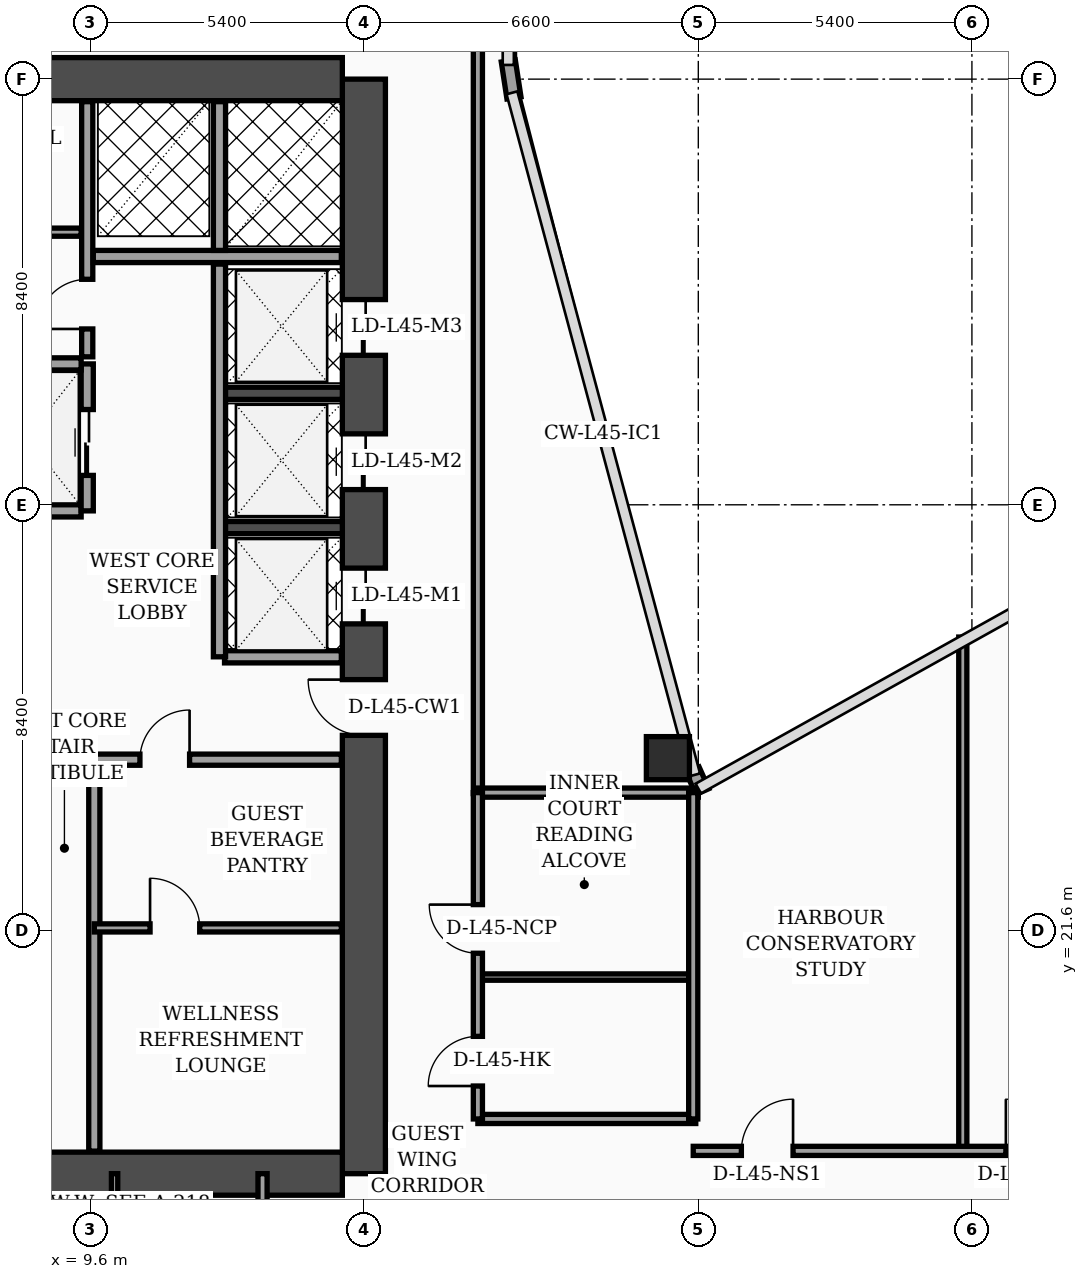
"""IFC4 building model, lengths in metres.
Left out: names, types, materials, properties, quantities, classifications, styles, units other than length and angle.
Written with IfcOpenShell. Run it as: python <this file> out.ifc"""

import sys

from ifc_helpers import new_model, si_unit, direction, frame, frame_2d, origin, origin_2d, place, context, subcontext, project, spatial, rectangle, hollow_rectangle, extrude, element, fill, save


model = new_model("IFC4")
c1 = context("Model", 3, precision=1e-05, world=origin(), true_north=direction((0.0, 1.0)))
c2 = subcontext(c1, "Body", "Model", "MODEL_VIEW")
j1 = project(units=[si_unit("LENGTHUNIT", "METRE"), si_unit("PLANEANGLEUNIT", "RADIAN")], contexts=[c1])
p1 = place(None, origin())
s1 = spatial("IfcSite", under=j1, at=p1, CompositionType="ELEMENT")
p2 = place(p1, origin())
s2 = spatial("IfcBuilding", under=s1, at=p2, CompositionType="ELEMENT")
p3 = place(p2, frame((0.0, 0.0, 182.7)))
s3 = spatial("IfcBuildingStorey", under=s2, at=p3, CompositionType="ELEMENT", Elevation=182.7)
p4 = place(p3, frame((15.0, 16.8, 0.0), z_axis=(0.0, 0.0, 1.0), x_axis=(0.0, 1.0, 0.0)))
e1 = element("IfcWall", 1, at=p4, inside=s3, PredefinedType="SHEAR", context=c2, shape_type="SweptSolid", body=[
    extrude(rectangle(XDim=21.6, YDim=0.85, at=frame_2d((10.8, 0.0))), origin(), (0.0, 0.0, 1.0), 3.52),
])
p5 = place(p4, frame((8.65, 0.0, 0.0)))
e2 = element("IfcOpeningElement", 2, at=p5, cuts=e1, PredefinedType="OPENING", context=c2, shape_type="SweptSolid", body=[
    extrude(rectangle(XDim=1.1, YDim=2.2, at=frame_2d((0.55, 1.1))), frame((0.0, 0.435, 0.0), z_axis=(0.0, -1.0, 0.0), x_axis=(1.0, 0.0, 0.0)), (0.0, 0.0, 1.0), 0.87),
])
p6 = place(p4, frame((10.85, 0.0, 0.0)))
e3 = element("IfcOpeningElement", 3, at=p6, cuts=e1, PredefinedType="OPENING", context=c2, shape_type="SweptSolid", body=[
    extrude(rectangle(XDim=1.1, YDim=2.2, at=frame_2d((0.55, 1.1))), frame((0.0, 0.435, 0.0), z_axis=(0.0, -1.0, 0.0), x_axis=(1.0, 0.0, 0.0)), (0.0, 0.0, 1.0), 0.87),
])
p7 = place(p4, frame((13.5, 0.0, 0.0)))
e4 = element("IfcOpeningElement", 4, at=p7, cuts=e1, PredefinedType="OPENING", context=c2, shape_type="SweptSolid", body=[
    extrude(rectangle(XDim=1.1, YDim=2.2, at=frame_2d((0.55, 1.1))), frame((0.0, 0.435, 0.0), z_axis=(0.0, -1.0, 0.0), x_axis=(1.0, 0.0, 0.0)), (0.0, 0.0, 1.0), 0.87),
])
p8 = place(p4, frame((16.15, 0.0, 0.0)))
e5 = element("IfcOpeningElement", 5, at=p8, cuts=e1, PredefinedType="OPENING", context=c2, shape_type="SweptSolid", body=[
    extrude(rectangle(XDim=1.1, YDim=2.2, at=frame_2d((0.55, 1.1))), frame((0.0, 0.435, 0.0), z_axis=(0.0, -1.0, 0.0), x_axis=(1.0, 0.0, 0.0)), (0.0, 0.0, 1.0), 0.87),
])
for number, where, z_axis, x_axis in (
    (6, (4.625, 38.4, 0.0), (0.0, 0.0, 1.0), (1.0, 0.0, 0.0)),
    (7, (4.625, 16.8, 0.0), (0.0, 0.0, 1.0), (1.0, 0.0, 0.0)),
):
    element("IfcWall", number, at=place(p3, frame(where, z_axis=z_axis, x_axis=x_axis)), inside=s3, PredefinedType="SHEAR", context=c2, shape_type="SweptSolid", body=[
        extrude(rectangle(XDim=9.95, YDim=0.85, at=frame_2d((4.975, 0.0))), origin(), (0.0, 0.0, 1.0), 3.52),
    ])
for number, where, z_axis, x_axis in (
    (8, (12.18, 29.55, 0.0), (0.0, 0.0, 1.0), (1.0, 0.0, 0.0)),
    (9, (12.18, 32.2, 0.0), (0.0, 0.0, 1.0), (1.0, 0.0, 0.0)),
):
    element("IfcWall", number, at=place(p3, frame(where, z_axis=z_axis, x_axis=x_axis)), inside=s3, PredefinedType="SOLIDWALL", context=c2, shape_type="SweptSolid", body=[
        extrude(rectangle(XDim=2.395, YDim=0.24, at=frame_2d((1.198, 0.0))), origin(), (0.0, 0.0, 1.0), 3.52),
    ])
p9 = place(p3, frame((21.0, 25.0, 0.0), z_axis=(0.0, 0.0, 1.0), x_axis=(1.0, 0.0, 0.0)))
e10 = element("IfcColumn", 10, at=p9, inside=s3, PredefinedType="COLUMN", context=c2, shape_type="SweptSolid", body=[
    extrude(hollow_rectangle(XDim=0.85, YDim=0.85, WallThickness=0.036, at=origin_2d()), origin(), (0.0, 0.0, 1.0), 3.52),
])
p10 = place(p3, frame((21.68, 24.34, 0.0), z_axis=(0.0, 0.0, 1.0), x_axis=(-0.40758134973, 0.913168901875, 0.0)))
e11 = element("IfcWall", 11, at=p10, inside=s3, PredefinedType="SOLIDWALL", context=c2, shape_type="SweptSolid", body=[
    extrude(rectangle(XDim=0.471, YDim=0.28, at=frame_2d((0.235, 0.0))), origin(), (0.0, 0.0, 1.0), 3.52),
])
p11 = place(p3, frame((17.962, 38.03, 0.0), z_axis=(0.0, 0.0, 1.0), x_axis=(-0.15141125477, 0.988470855377, 0.0)))
e12 = element("IfcWall", 12, at=p11, inside=s3, PredefinedType="SOLIDWALL", context=c2, shape_type="SweptSolid", body=[
    extrude(rectangle(XDim=0.739, YDim=0.28, at=frame_2d((0.369, 0.0))), origin(), (0.0, 0.0, 1.0), 3.52),
])
p12 = place(p3, frame((4.645, 29.88, 0.0), z_axis=(0.0, 0.0, 1.0), x_axis=(1.0, 0.0, 0.0)))
e13 = element("IfcWall", 13, at=p12, inside=s3, PredefinedType="SOLIDWALL", context=c2, shape_type="SweptSolid", body=[
    extrude(rectangle(XDim=4.775, YDim=0.24, at=frame_2d((2.387, 0.0))), origin(), (0.0, 0.0, 1.0), 3.52),
])
p13 = place(p12, frame((0.45, 0.0, 0.0)))
e14 = element("IfcOpeningElement", 14, at=p13, cuts=e13, PredefinedType="OPENING", context=c2, shape_type="SweptSolid", body=[
    extrude(rectangle(XDim=1.3, YDim=2.35, at=frame_2d((0.65, 1.175))), frame((0.0, 0.13, 0.0), z_axis=(0.0, -1.0, 0.0), x_axis=(1.0, 0.0, 0.0)), (0.0, 0.0, 1.0), 0.26),
])
p14 = place(p3, frame((9.54, 29.88, 0.0), z_axis=(0.0, 0.0, 1.0), x_axis=(0.0, 1.0, 0.0)))
e15 = element("IfcWall", 15, at=p14, inside=s3, PredefinedType="SOLIDWALL", context=c2, shape_type="SweptSolid", body=[
    extrude(rectangle(XDim=2.9, YDim=0.24, at=frame_2d((1.45, 0.0))), origin(), (0.0, 0.0, 1.0), 3.52),
])
p15 = place(p14, frame((0.7, 0.0, 0.0)))
e16 = element("IfcOpeningElement", 16, at=p15, cuts=e15, PredefinedType="OPENING", context=c2, shape_type="SweptSolid", body=[
    extrude(rectangle(XDim=1.3, YDim=2.35, at=frame_2d((0.65, 1.175))), frame((0.0, 0.13, 0.0), z_axis=(0.0, -1.0, 0.0), x_axis=(1.0, 0.0, 0.0)), (0.0, 0.0, 1.0), 0.26),
])
p16 = place(p3, frame((4.645, 32.78, 0.0), z_axis=(0.0, 0.0, 1.0), x_axis=(1.0, 0.0, 0.0)))
e17 = element("IfcWall", 17, at=p16, inside=s3, PredefinedType="SOLIDWALL", context=c2, shape_type="SweptSolid", body=[
    extrude(rectangle(XDim=4.775, YDim=0.24, at=frame_2d((2.387, 0.0))), origin(), (0.0, 0.0, 1.0), 3.17),
])
p17 = place(p3, frame((9.68, 17.245, 0.0), z_axis=(0.0, 0.0, 1.0), x_axis=(0.0, 1.0, 0.0)))
e18 = element("IfcWall", 18, at=p17, inside=s3, PredefinedType="SOLIDWALL", context=c2, shape_type="SweptSolid", body=[
    extrude(rectangle(XDim=7.755, YDim=0.22, at=frame_2d((3.877, 0.0))), origin(), (0.0, 0.0, 1.0), 3.52),
])
p18 = place(p3, frame((4.645, 35.38, 0.0), z_axis=(0.0, 0.0, 1.0), x_axis=(1.0, 0.0, 0.0)))
e19 = element("IfcWall", 19, at=p18, inside=s3, PredefinedType="PARTITIONING", context=c2, shape_type="SweptSolid", body=[
    extrude(rectangle(XDim=4.775, YDim=0.16, at=frame_2d((2.387, 0.0))), origin(), (0.0, 0.0, 1.0), 3.52),
])
p19 = place(p18, frame((1.3, 0.0, 0.0)))
e20 = element("IfcOpeningElement", 20, at=p19, cuts=e19, PredefinedType="OPENING", context=c2, shape_type="SweptSolid", body=[
    extrude(rectangle(XDim=0.98, YDim=2.15, at=frame_2d((0.49, 1.075))), frame((0.0, 0.09, 0.0), z_axis=(0.0, -1.0, 0.0), x_axis=(1.0, 0.0, 0.0)), (0.0, 0.0, 1.0), 0.18),
])
p20 = place(p3, frame((9.54, 32.92, 0.0), z_axis=(0.0, 0.0, 1.0), x_axis=(0.0, 1.0, 0.0)))
e21 = element("IfcWall", 21, at=p20, inside=s3, PredefinedType="SOLIDWALL", context=c2, shape_type="SweptSolid", body=[
    extrude(rectangle(XDim=5.035, YDim=0.22, at=frame_2d((2.518, 0.0))), origin(), (0.0, 0.0, 1.0), 3.52),
])
p21 = place(p20, frame((0.55, 0.0, 0.0)))
e22 = element("IfcOpeningElement", 22, at=p21, cuts=e21, PredefinedType="OPENING", context=c2, shape_type="SweptSolid", body=[
    extrude(rectangle(XDim=0.98, YDim=2.15, at=frame_2d((0.49, 1.075))), frame((0.0, 0.12, 0.0), z_axis=(0.0, -1.0, 0.0), x_axis=(1.0, 0.0, 0.0)), (0.0, 0.0, 1.0), 0.24),
])
p22 = place(p3, frame((9.68, 21.65, 0.0), z_axis=(0.0, 0.0, 1.0), x_axis=(1.0, 0.0, 0.0)))
e23 = element("IfcWall", 23, at=p22, inside=s3, PredefinedType="PARTITIONING", context=c2, shape_type="SweptSolid", body=[
    extrude(rectangle(XDim=4.875, YDim=0.16, at=frame_2d((2.438, 0.0))), origin(), (0.0, 0.0, 1.0), 3.52),
])
p23 = place(p22, frame((1.1, 0.0, 0.0)))
e24 = element("IfcOpeningElement", 24, at=p23, cuts=e23, PredefinedType="OPENING", context=c2, shape_type="SweptSolid", body=[
    extrude(rectangle(XDim=0.98, YDim=2.15, at=frame_2d((0.49, 1.075))), frame((0.0, 0.09, 0.0), z_axis=(0.0, -1.0, 0.0), x_axis=(1.0, 0.0, 0.0)), (0.0, 0.0, 1.0), 0.18),
])
p24 = place(p3, frame((9.68, 24.97, 0.0), z_axis=(0.0, 0.0, 1.0), x_axis=(1.0, 0.0, 0.0)))
e25 = element("IfcWall", 25, at=p24, inside=s3, PredefinedType="SOLIDWALL", context=c2, shape_type="SweptSolid", body=[
    extrude(rectangle(XDim=4.875, YDim=0.22, at=frame_2d((2.438, 0.0))), origin(), (0.0, 0.0, 1.0), 2.92),
])
p25 = place(p24, frame((0.9, 0.0, 0.0)))
e26 = element("IfcOpeningElement", 26, at=p25, cuts=e25, PredefinedType="OPENING", context=c2, shape_type="SweptSolid", body=[
    extrude(rectangle(XDim=0.98, YDim=2.15, at=frame_2d((0.49, 1.075))), frame((0.0, 0.12, 0.0), z_axis=(0.0, -1.0, 0.0), x_axis=(1.0, 0.0, 0.0)), (0.0, 0.0, 1.0), 0.24),
])
p26 = place(p3, frame((12.25, 27.0, 0.0), z_axis=(0.0, 0.0, 1.0), x_axis=(1.0, 0.0, 0.0)))
e27 = element("IfcWall", 27, at=p26, inside=s3, PredefinedType="SOLIDWALL", context=c2, shape_type="SweptSolid", body=[
    extrude(rectangle(XDim=2.305, YDim=0.24, at=frame_2d((1.152, 0.0))), origin(), (0.0, 0.0, 1.0), 3.52),
])
p27 = place(p3, frame((12.15, 27.0, 0.0), z_axis=(0.0, 0.0, 1.0), x_axis=(0.0, 1.0, 0.0)))
e28 = element("IfcWall", 28, at=p27, inside=s3, PredefinedType="SOLIDWALL", context=c2, shape_type="SweptSolid", body=[
    extrude(rectangle(XDim=7.75, YDim=0.24, at=frame_2d((3.875, 0.0))), origin(), (0.0, 0.0, 1.0), 3.52),
])
p28 = place(p3, frame((9.66, 34.9, 0.0), z_axis=(0.0, 0.0, 1.0), x_axis=(1.0, 0.0, 0.0)))
e29 = element("IfcWall", 29, at=p28, inside=s3, PredefinedType="SOLIDWALL", context=c2, shape_type="SweptSolid", body=[
    extrude(rectangle(XDim=4.895, YDim=0.24, at=frame_2d((2.448, 0.0))), origin(), (0.0, 0.0, 1.0), 3.52),
])
p29 = place(p3, frame((12.15, 35.02, 0.0), z_axis=(0.0, 0.0, 1.0), x_axis=(0.0, 1.0, 0.0)))
e30 = element("IfcWall", 30, at=p29, inside=s3, PredefinedType="SOLIDWALL", context=c2, shape_type="SweptSolid", body=[
    extrude(rectangle(XDim=2.935, YDim=0.24, at=frame_2d((1.468, 0.0))), origin(), (0.0, 0.0, 1.0), 3.52),
])
p30 = place(p3, frame((10.08, 14.75, 0.0), z_axis=(0.0, 0.0, 1.0), x_axis=(0.0, 1.0, 0.0)))
e31 = element("IfcWall", 31, at=p30, inside=s3, PredefinedType="PARTITIONING", context=c2, shape_type="SweptSolid", body=[
    extrude(rectangle(XDim=2.05, YDim=0.125, at=frame_2d((1.025, 0.0))), origin(), (0.0, 0.0, 1.0), 3.52),
])
p31 = place(p3, frame((13.0, 2.44, 0.0), z_axis=(0.0, 0.0, 1.0), x_axis=(0.0, 1.0, 0.0)))
e32 = element("IfcWall", 32, at=p31, inside=s3, PredefinedType="PARTITIONING", context=c2, shape_type="SweptSolid", body=[
    extrude(rectangle(XDim=14.36, YDim=0.18, at=frame_2d((7.18, 0.0))), origin(), (0.0, 0.0, 1.0), 2.92),
])
p32 = place(p31, frame((3.01, 0.0, 0.0)))
e33 = element("IfcOpeningElement", 33, at=p32, cuts=e32, PredefinedType="OPENING", context=c2, shape_type="SweptSolid", body=[
    extrude(rectangle(XDim=1.02, YDim=2.2, at=frame_2d((0.51, 1.1))), frame((0.0, 0.1, 0.0), z_axis=(0.0, -1.0, 0.0), x_axis=(1.0, 0.0, 0.0)), (0.0, 0.0, 1.0), 0.2),
])
p33 = place(p31, frame((9.35, 0.0, 0.0)))
e34 = element("IfcOpeningElement", 34, at=p33, cuts=e32, PredefinedType="OPENING", context=c2, shape_type="SweptSolid", body=[
    extrude(rectangle(XDim=1.02, YDim=2.2, at=frame_2d((0.51, 1.1))), frame((0.0, 0.1, 0.0), z_axis=(0.0, -1.0, 0.0), x_axis=(1.0, 0.0, 0.0)), (0.0, 0.0, 1.0), 0.2),
])
p34 = place(p3, frame((17.25, 24.3, 0.0), z_axis=(0.0, 0.0, 1.0), x_axis=(0.0, 1.0, 0.0)))
e35 = element("IfcWall", 35, at=p34, inside=s3, PredefinedType="PARTITIONING", context=c2, shape_type="SweptSolid", body=[
    extrude(rectangle(XDim=17.65, YDim=0.18, at=frame_2d((8.825, 0.0))), origin(), (0.0, 0.0, 1.0), 2.92),
])
p35 = place(p3, frame((17.25, 17.88, 0.0), z_axis=(0.0, 0.0, 1.0), x_axis=(1.0, 0.0, 0.0)))
e36 = element("IfcWall", 36, at=p35, inside=s3, PredefinedType="PARTITIONING", context=c2, shape_type="SweptSolid", body=[
    extrude(rectangle(XDim=4.3, YDim=0.18, at=frame_2d((2.15, 0.0))), origin(), (0.0, 0.0, 1.0), 3.52),
])
p36 = place(p3, frame((17.25, 20.68, 0.0), z_axis=(0.0, 0.0, 1.0), x_axis=(1.0, 0.0, 0.0)))
e37 = element("IfcWall", 37, at=p36, inside=s3, PredefinedType="PARTITIONING", context=c2, shape_type="SweptSolid", body=[
    extrude(rectangle(XDim=4.3, YDim=0.125, at=frame_2d((2.15, 0.0))), origin(), (0.0, 0.0, 1.0), 3.52),
])
p37 = place(p3, frame((17.25, 24.32, 0.0), z_axis=(0.0, 0.0, 1.0), x_axis=(1.0, 0.0, 0.0)))
e38 = element("IfcWall", 38, at=p37, inside=s3, PredefinedType="PARTITIONING", context=c2, shape_type="SweptSolid", body=[
    extrude(rectangle(XDim=4.35, YDim=0.18, at=frame_2d((2.175, 0.0))), origin(), (0.0, 0.0, 1.0), 3.52),
])
p38 = place(p3, frame((21.5, 17.88, 0.0), z_axis=(0.0, 0.0, 1.0), x_axis=(0.0, 1.0, 0.0)))
e39 = element("IfcWall", 39, at=p38, inside=s3, PredefinedType="PARTITIONING", context=c2, shape_type="SweptSolid", body=[
    extrude(rectangle(XDim=6.44, YDim=0.18, at=frame_2d((3.22, 0.0))), origin(), (0.0, 0.0, 1.0), 3.52),
])
p39 = place(p3, frame((17.25, 17.88, 0.0), z_axis=(0.0, 0.0, 1.0), x_axis=(0.0, 1.0, 0.0)))
e40 = element("IfcWall", 40, at=p39, inside=s3, PredefinedType="PARTITIONING", context=c2, shape_type="SweptSolid", body=[
    extrude(rectangle(XDim=6.44, YDim=0.18, at=frame_2d((3.22, 0.0))), origin(), (0.0, 0.0, 1.0), 3.52),
])
p40 = place(p39, frame((0.65, 0.0, 0.0)))
e41 = element("IfcOpeningElement", 41, at=p40, cuts=e40, PredefinedType="OPENING", context=c2, shape_type="SweptSolid", body=[
    extrude(rectangle(XDim=0.98, YDim=2.15, at=frame_2d((0.49, 1.075))), frame((0.0, 0.1, 0.0), z_axis=(0.0, -1.0, 0.0), x_axis=(1.0, 0.0, 0.0)), (0.0, 0.0, 1.0), 0.2),
])
p41 = place(p39, frame((3.27, 0.0, 0.0)))
e42 = element("IfcOpeningElement", 42, at=p41, cuts=e40, PredefinedType="OPENING", context=c2, shape_type="SweptSolid", body=[
    extrude(rectangle(XDim=0.96, YDim=2.2, at=frame_2d((0.48, 1.1))), frame((0.0, 0.1, 0.0), z_axis=(0.0, -1.0, 0.0), x_axis=(1.0, 0.0, 0.0)), (0.0, 0.0, 1.0), 0.2),
])
p42 = place(p3, frame((26.82, 17.25, 0.0), z_axis=(0.0, 0.0, 1.0), x_axis=(0.0, 1.0, 0.0)))
e43 = element("IfcWall", 43, at=p42, inside=s3, PredefinedType="PARTITIONING", context=c2, shape_type="SweptSolid", body=[
    extrude(rectangle(XDim=10.14, YDim=0.16, at=frame_2d((5.07, 0.0))), origin(), (0.0, 0.0, 1.0), 2.92),
])
p43 = place(p3, frame((21.5, 17.25, 0.0), z_axis=(0.0, 0.0, 1.0), x_axis=(1.0, 0.0, 0.0)))
e44 = element("IfcWall", 44, at=p43, inside=s3, PredefinedType="PARTITIONING", context=c2, shape_type="SweptSolid", body=[
    extrude(rectangle(XDim=15.75, YDim=0.18, at=frame_2d((7.875, 0.0))), origin(), (0.0, 0.0, 1.0), 2.92),
])
p44 = place(p43, frame((0.95, 0.0, 0.0)))
e45 = element("IfcOpeningElement", 45, at=p44, cuts=e44, PredefinedType="OPENING", context=c2, shape_type="SweptSolid", body=[
    extrude(rectangle(XDim=1.02, YDim=2.2, at=frame_2d((0.51, 1.1))), frame((0.0, 0.1, 0.0), z_axis=(0.0, -1.0, 0.0), x_axis=(1.0, 0.0, 0.0)), (0.0, 0.0, 1.0), 0.2),
])
p45 = place(p43, frame((6.17, 0.0, 0.0)))
e46 = element("IfcOpeningElement", 46, at=p45, cuts=e44, PredefinedType="OPENING", context=c2, shape_type="SweptSolid", body=[
    extrude(rectangle(XDim=1.02, YDim=2.2, at=frame_2d((0.51, 1.1))), frame((0.0, 0.1, 0.0), z_axis=(0.0, -1.0, 0.0), x_axis=(1.0, 0.0, 0.0)), (0.0, 0.0, 1.0), 0.2),
])
p46 = place(p43, frame((11.38, 0.0, 0.0)))
e47 = element("IfcOpeningElement", 47, at=p46, cuts=e44, PredefinedType="OPENING", context=c2, shape_type="SweptSolid", body=[
    extrude(rectangle(XDim=1.02, YDim=2.2, at=frame_2d((0.51, 1.1))), frame((0.0, 0.1, 0.0), z_axis=(0.0, -1.0, 0.0), x_axis=(1.0, 0.0, 0.0)), (0.0, 0.0, 1.0), 0.2),
])
p47 = place(p15, origin())
e48 = element("IfcDoor", 48, at=p47, inside=s3, OperationType="DOUBLE_DOOR_SLIDING", PredefinedType="DOOR", context=c2, shape_type="SweptSolid", body=[
    extrude(rectangle(XDim=1.3, YDim=2.35, at=frame_2d((0.65, 1.175))), frame((0.0, 0.025, 0.0), z_axis=(0.0, -1.0, 0.0), x_axis=(1.0, 0.0, 0.0)), (0.0, 0.0, 1.0), 0.05),
])
fill(e16, e48)
p48 = place(p21, origin())
e49 = element("IfcDoor", 49, at=p48, inside=s3, OperationType="SINGLE_SWING_LEFT", PredefinedType="DOOR", context=c2, shape_type="SweptSolid", body=[
    extrude(rectangle(XDim=0.98, YDim=2.15, at=frame_2d((0.49, 1.075))), frame((0.0, 0.025, 0.0), z_axis=(0.0, -1.0, 0.0), x_axis=(1.0, 0.0, 0.0)), (0.0, 0.0, 1.0), 0.05),
])
fill(e22, e49)
p49 = place(p23, origin())
e50 = element("IfcDoor", 50, at=p49, inside=s3, OperationType="SINGLE_SWING_LEFT", PredefinedType="DOOR", context=c2, shape_type="SweptSolid", body=[
    extrude(rectangle(XDim=0.98, YDim=2.15, at=frame_2d((0.49, 1.075))), frame((0.0, 0.025, 0.0), z_axis=(0.0, -1.0, 0.0), x_axis=(1.0, 0.0, 0.0)), (0.0, 0.0, 1.0), 0.05),
])
fill(e24, e50)
p50 = place(p25, origin())
e51 = element("IfcDoor", 51, at=p50, inside=s3, OperationType="SINGLE_SWING_RIGHT", PredefinedType="DOOR", context=c2, shape_type="SweptSolid", body=[
    extrude(rectangle(XDim=0.98, YDim=2.15, at=frame_2d((0.49, 1.075))), frame((0.0, 0.025, 0.0), z_axis=(0.0, -1.0, 0.0), x_axis=(1.0, 0.0, 0.0)), (0.0, 0.0, 1.0), 0.05),
])
fill(e26, e51)
p51 = place(p40, origin())
e52 = element("IfcDoor", 52, at=p51, inside=s3, OperationType="SINGLE_SWING_LEFT", PredefinedType="DOOR", context=c2, shape_type="SweptSolid", body=[
    extrude(rectangle(XDim=0.98, YDim=2.15, at=frame_2d((0.49, 1.075))), frame((0.0, 0.025, 0.0), z_axis=(0.0, -1.0, 0.0), x_axis=(1.0, 0.0, 0.0)), (0.0, 0.0, 1.0), 0.05),
])
fill(e41, e52)
p52 = place(p41, origin())
e53 = element("IfcDoor", 53, at=p52, inside=s3, OperationType="SINGLE_SWING_RIGHT", PredefinedType="DOOR", context=c2, shape_type="SweptSolid", body=[
    extrude(rectangle(XDim=0.96, YDim=2.2, at=frame_2d((0.48, 1.1))), frame((0.0, 0.025, 0.0), z_axis=(0.0, -1.0, 0.0), x_axis=(1.0, 0.0, 0.0)), (0.0, 0.0, 1.0), 0.05),
])
fill(e42, e53)
p53 = place(p44, origin())
e54 = element("IfcDoor", 54, at=p53, inside=s3, OperationType="SINGLE_SWING_RIGHT", PredefinedType="DOOR", context=c2, shape_type="SweptSolid", body=[
    extrude(rectangle(XDim=1.02, YDim=2.2, at=frame_2d((0.51, 1.1))), frame((0.0, 0.025, 0.0), z_axis=(0.0, -1.0, 0.0), x_axis=(1.0, 0.0, 0.0)), (0.0, 0.0, 1.0), 0.05),
])
fill(e45, e54)
p54 = place(p45, origin())
e55 = element("IfcDoor", 55, at=p54, inside=s3, OperationType="SINGLE_SWING_LEFT", PredefinedType="DOOR", context=c2, shape_type="SweptSolid", body=[
    extrude(rectangle(XDim=1.02, YDim=2.2, at=frame_2d((0.51, 1.1))), frame((0.0, 0.025, 0.0), z_axis=(0.0, -1.0, 0.0), x_axis=(1.0, 0.0, 0.0)), (0.0, 0.0, 1.0), 0.05),
])
fill(e46, e55)
p55 = place(p5, origin())
e56 = element("IfcDoor", 56, at=p55, inside=s3, OperationType="SINGLE_SWING_RIGHT", PredefinedType="DOOR", context=c2, shape_type="SweptSolid", body=[
    extrude(rectangle(XDim=1.1, YDim=2.2, at=frame_2d((0.55, 1.1))), frame((0.0, 0.025, 0.0), z_axis=(0.0, -1.0, 0.0), x_axis=(1.0, 0.0, 0.0)), (0.0, 0.0, 1.0), 0.05),
])
fill(e2, e56)
p56 = place(p6, origin())
e57 = element("IfcDoor", 57, at=p56, inside=s3, OperationType="DOUBLE_DOOR_SLIDING", PredefinedType="DOOR", context=c2, shape_type="SweptSolid", body=[
    extrude(rectangle(XDim=1.1, YDim=2.2, at=frame_2d((0.55, 1.1))), frame((0.0, 0.025, 0.0), z_axis=(0.0, -1.0, 0.0), x_axis=(1.0, 0.0, 0.0)), (0.0, 0.0, 1.0), 0.05),
])
fill(e3, e57)
p57 = place(p7, origin())
e58 = element("IfcDoor", 58, at=p57, inside=s3, OperationType="DOUBLE_DOOR_SLIDING", PredefinedType="DOOR", context=c2, shape_type="SweptSolid", body=[
    extrude(rectangle(XDim=1.1, YDim=2.2, at=frame_2d((0.55, 1.1))), frame((0.0, 0.025, 0.0), z_axis=(0.0, -1.0, 0.0), x_axis=(1.0, 0.0, 0.0)), (0.0, 0.0, 1.0), 0.05),
])
fill(e4, e58)
p58 = place(p8, origin())
e59 = element("IfcDoor", 59, at=p58, inside=s3, OperationType="DOUBLE_DOOR_SLIDING", PredefinedType="DOOR", context=c2, shape_type="SweptSolid", body=[
    extrude(rectangle(XDim=1.1, YDim=2.2, at=frame_2d((0.55, 1.1))), frame((0.0, 0.025, 0.0), z_axis=(0.0, -1.0, 0.0), x_axis=(1.0, 0.0, 0.0)), (0.0, 0.0, 1.0), 0.05),
])
fill(e5, e59)
save(model, sys.argv[1])
